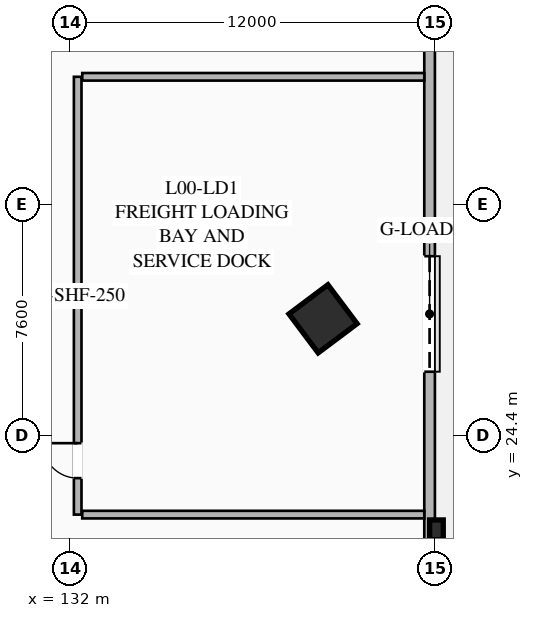
"""IFC4 building model, lengths in metres.
Left out: names, types, materials, properties, quantities, classifications, styles, units other than length and angle.
Written with IfcOpenShell. Run it as: python <this file> out.ifc"""

import sys

from ifc_helpers import new_model, si_unit, direction, frame, frame_2d, origin, origin_2d, place, context, subcontext, project, spatial, rectangle, hollow_rectangle, extrude, element, fill, save


model = new_model("IFC4")
c1 = context("Model", 3, precision=1e-05, world=origin(), true_north=direction((0.0, 1.0)))
c2 = subcontext(c1, "Body", "Model", "MODEL_VIEW")
j1 = project(units=[si_unit("LENGTHUNIT", "METRE"), si_unit("PLANEANGLEUNIT", "RADIAN")], contexts=[c1])
p1 = place(None, origin())
s1 = spatial("IfcSite", under=j1, at=p1, CompositionType="ELEMENT")
p2 = place(p1, origin())
s2 = spatial("IfcBuilding", under=s1, at=p2, CompositionType="ELEMENT")
p3 = place(p2, origin())
s3 = spatial("IfcBuildingStorey", under=s2, at=p3, CompositionType="ELEMENT", Elevation=0.0)
p4 = place(p3, frame((140.32, 28.24, 0.0), z_axis=(0.0, 0.0, 1.0), x_axis=(0.799999996291, 0.600000004945, 0.0)))
e1 = element("IfcColumn", 1, at=p4, inside=s3, PredefinedType="COLUMN", context=c2, shape_type="SweptSolid", body=[
    extrude(hollow_rectangle(XDim=1.6, YDim=1.6, WallThickness=0.06, at=origin_2d()), origin(), (0.0, 0.0, 1.0), 5.14),
])
p5 = place(p3, frame((143.825, 63.65, 0.0), z_axis=(0.0, 0.0, 1.0), x_axis=(0.0, -1.0, 0.0)))
e2 = element("IfcWall", 2, at=p5, inside=s3, PredefinedType="SOLIDWALL", context=c2, shape_type="SweptSolid", body=[
    extrude(rectangle(XDim=63.3, YDim=0.35, at=frame_2d((31.65, 0.0))), origin(), (0.0, 0.0, 1.0), 5.14),
])
p6 = place(p5, frame((33.35, 0.0, 0.0)))
e3 = element("IfcOpeningElement", 3, at=p6, cuts=e2, PredefinedType="OPENING", context=c2, shape_type="SweptSolid", body=[
    extrude(rectangle(XDim=3.8, YDim=4.2, at=frame_2d((1.9, 2.1))), frame((0.0, 0.185, 0.0), z_axis=(0.0, -1.0, 0.0), x_axis=(1.0, 0.0, 0.0)), (0.0, 0.0, 1.0), 0.37),
])
p7 = place(p3, frame((144.05, 21.3, 0.0), z_axis=(0.0, 0.0, 1.0), x_axis=(0.0, 1.0, 0.0)))
e4 = element("IfcColumn", 4, at=p7, inside=s3, PredefinedType="PILASTER", context=c2, shape_type="SweptSolid", body=[
    extrude(rectangle(XDim=0.65, YDim=0.45, at=origin_2d()), origin(), (0.0, 0.0, 1.0), 5.14),
])
p8 = place(p3, frame((132.25, 21.8, 0.0), z_axis=(0.0, 0.0, 1.0), x_axis=(0.0, 1.0, 0.0)))
e5 = element("IfcWall", 5, at=p8, inside=s3, PredefinedType="SOLIDWALL", context=c2, shape_type="SweptSolid", body=[
    extrude(rectangle(XDim=14.4, YDim=0.25, at=frame_2d((7.2, 0.0))), origin(), (0.0, 0.0, 1.0), 3.31),
])
p9 = place(p8, frame((1.2, 0.0, 0.0)))
e6 = element("IfcOpeningElement", 6, at=p9, cuts=e5, PredefinedType="OPENING", context=c2, shape_type="SweptSolid", body=[
    extrude(rectangle(XDim=1.15, YDim=2.2, at=frame_2d((0.575, 1.1))), frame((0.0, 0.135, 0.0), z_axis=(0.0, -1.0, 0.0), x_axis=(1.0, 0.0, 0.0)), (0.0, 0.0, 1.0), 0.27),
])
for number, where, z_axis, x_axis in (
    (7, (132.4, 36.2, 0.0), (0.0, 0.0, 1.0), (1.0, 0.0, 0.0)),
    (8, (132.4, 21.8, 0.0), (0.0, 0.0, 1.0), (1.0, 0.0, 0.0)),
):
    element("IfcWall", number, at=place(p3, frame(where, z_axis=z_axis, x_axis=x_axis)), inside=s3, PredefinedType="SOLIDWALL", context=c2, shape_type="SweptSolid", body=[
        extrude(rectangle(XDim=11.25, YDim=0.25, at=frame_2d((5.625, 0.0))), origin(), (0.0, 0.0, 1.0), 3.31),
    ])
p10 = place(p6, origin())
e9 = element("IfcDoor", 9, at=p10, inside=s3, OperationType="ROLLINGUP", PredefinedType="GATE", context=c2, shape_type="SweptSolid", body=[
    extrude(rectangle(XDim=3.8, YDim=4.2, at=frame_2d((1.9, 2.1))), frame((0.0, 0.025, 0.0), z_axis=(0.0, -1.0, 0.0), x_axis=(1.0, 0.0, 0.0)), (0.0, 0.0, 1.0), 0.05),
])
fill(e3, e9)
p11 = place(p9, origin())
e10 = element("IfcDoor", 10, at=p11, inside=s3, OperationType="SINGLE_SWING_RIGHT", PredefinedType="DOOR", context=c2, shape_type="SweptSolid", body=[
    extrude(rectangle(XDim=1.15, YDim=2.2, at=frame_2d((0.575, 1.1))), frame((0.0, 0.025, 0.0), z_axis=(0.0, -1.0, 0.0), x_axis=(1.0, 0.0, 0.0)), (0.0, 0.0, 1.0), 0.05),
])
fill(e6, e10)
save(model, sys.argv[1])
